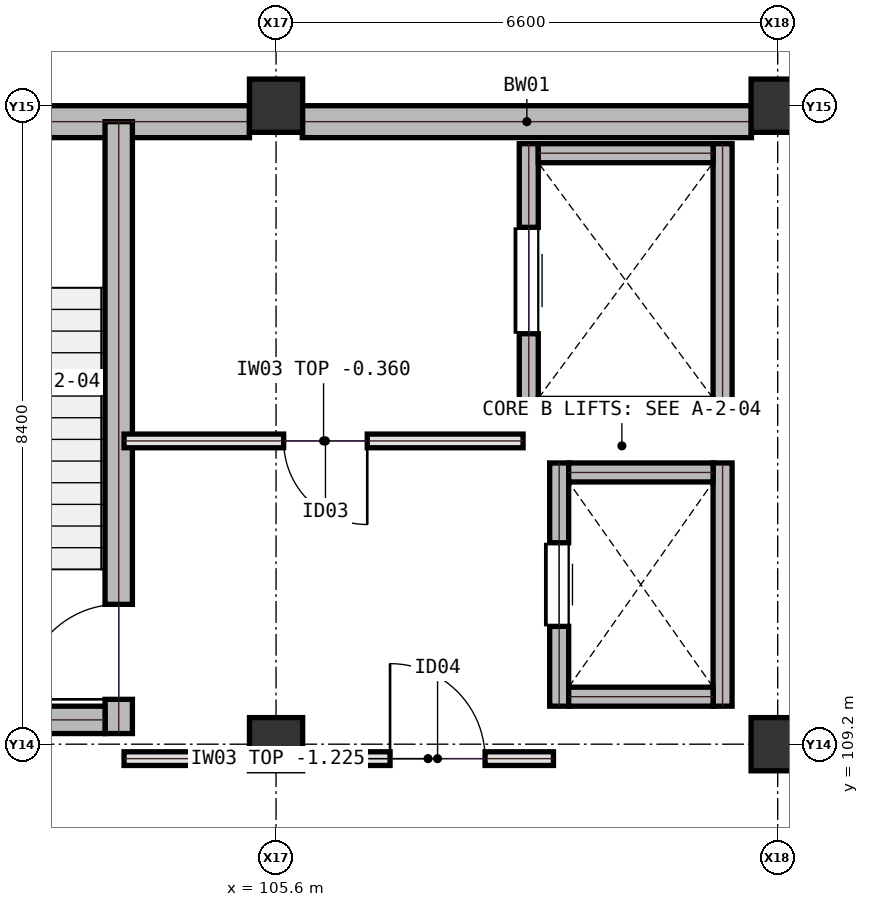
"""IFC4 building model, lengths in metres.
Left out: names, types, materials, properties, quantities, classifications, styles, units other than length and angle.
Written with IfcOpenShell. Run it as: python <this file> out.ifc"""

import sys

from ifc_helpers import new_model, si_unit, direction, frame, frame_2d, origin, origin_2d, place, context, subcontext, project, spatial, rectangle, extrude, element, fill, save


model = new_model("IFC4")
c1 = context("Model", 3, precision=1e-05, world=origin(), true_north=direction((0.0, 1.0)))
c2 = subcontext(c1, "Body", "Model", "MODEL_VIEW")
j1 = project(units=[si_unit("LENGTHUNIT", "METRE"), si_unit("PLANEANGLEUNIT", "RADIAN")], contexts=[c1])
p1 = place(None, origin())
s1 = spatial("IfcSite", under=j1, at=p1, CompositionType="ELEMENT")
p2 = place(p1, origin())
s2 = spatial("IfcBuilding", under=s1, at=p2, CompositionType="ELEMENT")
p3 = place(p2, frame((0.0, 0.0, -4.5)))
s3 = spatial("IfcBuildingStorey", under=s2, at=p3, CompositionType="ELEMENT", Elevation=-4.5)
for number, where, z_axis, x_axis in (
    (1, (105.6, 109.2, 0.0), (0.0, 0.0, 1.0), (1.0, 0.0, 0.0)),
    (2, (105.6, 117.6, 0.0), (0.0, 0.0, 1.0), (1.0, 0.0, 0.0)),
    (3, (112.2, 109.2, 0.0), (0.0, 0.0, 1.0), (1.0, 0.0, 0.0)),
    (4, (112.2, 117.6, 0.0), (0.0, 0.0, 1.0), (1.0, 0.0, 0.0)),
):
    element("IfcColumn", number, at=place(p3, frame(where, z_axis=z_axis, x_axis=x_axis)), inside=s3, PredefinedType="COLUMN", context=c2, shape_type="SweptSolid", body=[
        extrude(rectangle(XDim=0.7, YDim=0.7, at=origin_2d()), origin(), (0.0, 0.0, 1.0), 4.5),
    ])
p4 = place(p3, frame((105.25, 117.39, 0.0), z_axis=(0.0, 0.0, 1.0), x_axis=(-1.0, 0.0, 0.0)))
e5 = element("IfcWall", 5, at=p4, inside=s3, PredefinedType="SOLIDWALL", context=c2, shape_type="SweptSolid", body=[
    extrude(rectangle(XDim=5.9, YDim=0.42, at=frame_2d((2.95, 0.0))), origin(), (0.0, 0.0, 1.0), 4.14),
])
p5 = place(p3, frame((111.855, 117.39, 0.0), z_axis=(0.0, 0.0, 1.0), x_axis=(-1.0, 0.0, 0.0)))
e6 = element("IfcWall", 6, at=p5, inside=s3, PredefinedType="SOLIDWALL", context=c2, shape_type="SweptSolid", body=[
    extrude(rectangle(XDim=5.91, YDim=0.42, at=frame_2d((2.955, 0.0))), origin(), (0.0, 0.0, 1.0), 4.14),
])
p6 = place(p3, frame((103.53, 109.34, 0.0), z_axis=(0.0, 0.0, 1.0), x_axis=(0.0, 1.0, 0.0)))
e7 = element("IfcWall", 7, at=p6, inside=s3, PredefinedType="SHEAR", context=c2, shape_type="SweptSolid", body=[
    extrude(rectangle(XDim=8.05, YDim=0.36, at=frame_2d((4.025, 0.0))), origin(), (0.0, 0.0, 1.0), 4.14),
])
p7 = place(p6, frame((0.45, 0.0, 0.0)))
e8 = element("IfcOpeningElement", 8, at=p7, cuts=e7, PredefinedType="OPENING", context=c2, shape_type="SweptSolid", body=[
    extrude(rectangle(XDim=1.25, YDim=2.15, at=frame_2d((0.625, 1.075))), frame((0.0, 0.19, 0.0), z_axis=(0.0, -1.0, 0.0), x_axis=(1.0, 0.0, 0.0)), (0.0, 0.0, 1.0), 0.38),
])
p8 = place(p3, frame((99.55, 109.52, 0.0), z_axis=(0.0, 0.0, 1.0), x_axis=(1.0, 0.0, 0.0)))
e9 = element("IfcWall", 9, at=p8, inside=s3, PredefinedType="SHEAR", context=c2, shape_type="SweptSolid", body=[
    extrude(rectangle(XDim=3.8, YDim=0.36, at=frame_2d((1.9, 0.0))), origin(), (0.0, 0.0, 1.0), 4.14),
])
p9 = place(p3, frame((109.325, 109.7, 0.0), z_axis=(0.0, 0.0, 1.0), x_axis=(0.0, 1.0, 0.0)))
e10 = element("IfcWall", 10, at=p9, inside=s3, PredefinedType="SHEAR", context=c2, shape_type="SweptSolid", body=[
    extrude(rectangle(XDim=3.2, YDim=0.25, at=frame_2d((1.6, 0.0))), origin(), (0.0, 0.0, 1.0), 4.14),
])
p10 = place(p9, frame((1.05, 0.0, 0.0)))
e11 = element("IfcOpeningElement", 11, at=p10, cuts=e10, PredefinedType="OPENING", context=c2, shape_type="SweptSolid", body=[
    extrude(rectangle(XDim=1.1, YDim=2.15, at=frame_2d((0.55, 1.075))), frame((0.0, 0.135, 0.0), z_axis=(0.0, -1.0, 0.0), x_axis=(1.0, 0.0, 0.0)), (0.0, 0.0, 1.0), 0.27),
])
p11 = place(p3, frame((111.475, 109.7, 0.0), z_axis=(0.0, 0.0, 1.0), x_axis=(0.0, 1.0, 0.0)))
e12 = element("IfcWall", 12, at=p11, inside=s3, PredefinedType="SHEAR", context=c2, shape_type="SweptSolid", body=[
    extrude(rectangle(XDim=3.2, YDim=0.25, at=frame_2d((1.6, 0.0))), origin(), (0.0, 0.0, 1.0), 4.14),
])
for number, where, z_axis, x_axis in (
    (13, (109.45, 109.825, 0.0), (0.0, 0.0, 1.0), (1.0, 0.0, 0.0)),
    (14, (109.45, 112.775, 0.0), (0.0, 0.0, 1.0), (1.0, 0.0, 0.0)),
):
    element("IfcWall", number, at=place(p3, frame(where, z_axis=z_axis, x_axis=x_axis)), inside=s3, PredefinedType="SHEAR", context=c2, shape_type="SweptSolid", body=[
        extrude(rectangle(XDim=1.9, YDim=0.25, at=frame_2d((0.95, 0.0))), origin(), (0.0, 0.0, 1.0), 4.14),
    ])
p12 = place(p3, frame((108.925, 113.5, 0.0), z_axis=(0.0, 0.0, 1.0), x_axis=(0.0, 1.0, 0.0)))
e15 = element("IfcWall", 15, at=p12, inside=s3, PredefinedType="SHEAR", context=c2, shape_type="SweptSolid", body=[
    extrude(rectangle(XDim=3.6, YDim=0.25, at=frame_2d((1.8, 0.0))), origin(), (0.0, 0.0, 1.0), 4.14),
])
p13 = place(p12, frame((1.1, 0.0, 0.0)))
e16 = element("IfcOpeningElement", 16, at=p13, cuts=e15, PredefinedType="OPENING", context=c2, shape_type="SweptSolid", body=[
    extrude(rectangle(XDim=1.4, YDim=2.2, at=frame_2d((0.7, 1.1))), frame((0.0, 0.135, 0.0), z_axis=(0.0, -1.0, 0.0), x_axis=(1.0, 0.0, 0.0)), (0.0, 0.0, 1.0), 0.27),
])
p14 = place(p3, frame((111.475, 113.5, 0.0), z_axis=(0.0, 0.0, 1.0), x_axis=(0.0, 1.0, 0.0)))
e17 = element("IfcWall", 17, at=p14, inside=s3, PredefinedType="SHEAR", context=c2, shape_type="SweptSolid", body=[
    extrude(rectangle(XDim=3.6, YDim=0.25, at=frame_2d((1.8, 0.0))), origin(), (0.0, 0.0, 1.0), 4.14),
])
for number, where, z_axis, x_axis in (
    (18, (109.05, 113.625, 0.0), (0.0, 0.0, 1.0), (1.0, 0.0, 0.0)),
    (19, (109.05, 116.975, 0.0), (0.0, 0.0, 1.0), (1.0, 0.0, 0.0)),
):
    element("IfcWall", number, at=place(p3, frame(where, z_axis=z_axis, x_axis=x_axis)), inside=s3, PredefinedType="SHEAR", context=c2, shape_type="SweptSolid", body=[
        extrude(rectangle(XDim=2.3, YDim=0.25, at=frame_2d((1.15, 0.0))), origin(), (0.0, 0.0, 1.0), 4.14),
    ])
p15 = place(p3, frame((103.6, 109.01, 0.0), z_axis=(0.0, 0.0, 1.0), x_axis=(1.0, 0.0, 0.0)))
e20 = element("IfcWall", 20, at=p15, inside=s3, PredefinedType="SOLIDWALL", context=c2, shape_type="SweptSolid", body=[
    extrude(rectangle(XDim=1.65, YDim=0.18, at=frame_2d((0.825, 0.0))), origin(), (0.0, 0.0, 1.0), 3.275),
])
p16 = place(p3, frame((105.95, 109.01, 0.0), z_axis=(0.0, 0.0, 1.0), x_axis=(1.0, 0.0, 0.0)))
e21 = element("IfcWall", 21, at=p16, inside=s3, PredefinedType="SOLIDWALL", context=c2, shape_type="SweptSolid", body=[
    extrude(rectangle(XDim=3.3, YDim=0.18, at=frame_2d((1.65, 0.0))), origin(), (0.0, 0.0, 1.0), 3.275),
])
p17 = place(p16, frame((1.15, 0.0, 0.0)))
e22 = element("IfcOpeningElement", 22, at=p17, cuts=e21, PredefinedType="OPENING", context=c2, shape_type="SweptSolid", body=[
    extrude(rectangle(XDim=1.25, YDim=2.15, at=frame_2d((0.625, 1.075))), frame((0.0, 0.1, 0.0), z_axis=(0.0, -1.0, 0.0), x_axis=(1.0, 0.0, 0.0)), (0.0, 0.0, 1.0), 0.2),
])
p18 = place(p3, frame((103.6, 113.19, 0.0), z_axis=(0.0, 0.0, 1.0), x_axis=(1.0, 0.0, 0.0)))
e23 = element("IfcWall", 23, at=p18, inside=s3, PredefinedType="SOLIDWALL", context=c2, shape_type="SweptSolid", body=[
    extrude(rectangle(XDim=5.25, YDim=0.18, at=frame_2d((2.625, 0.0))), origin(), (0.0, 0.0, 1.0), 4.14),
])
p19 = place(p18, frame((2.1, 0.0, 0.0)))
e24 = element("IfcOpeningElement", 24, at=p19, cuts=e23, PredefinedType="OPENING", context=c2, shape_type="SweptSolid", body=[
    extrude(rectangle(XDim=1.1, YDim=2.15, at=frame_2d((0.55, 1.075))), frame((0.0, 0.1, 0.0), z_axis=(0.0, -1.0, 0.0), x_axis=(1.0, 0.0, 0.0)), (0.0, 0.0, 1.0), 0.2),
])
p20 = place(p7, origin())
e25 = element("IfcDoor", 25, at=p20, inside=s3, OperationType="SINGLE_SWING_LEFT", PredefinedType="DOOR", context=c2, shape_type="SweptSolid", body=[
    extrude(rectangle(XDim=1.25, YDim=2.15, at=frame_2d((0.625, 1.075))), frame((0.0, 0.025, 0.0), z_axis=(0.0, -1.0, 0.0), x_axis=(1.0, 0.0, 0.0)), (0.0, 0.0, 1.0), 0.05),
])
fill(e8, e25)
p21 = place(p10, origin())
e26 = element("IfcDoor", 26, at=p21, inside=s3, OperationType="SLIDING_TO_LEFT", PredefinedType="DOOR", context=c2, shape_type="SweptSolid", body=[
    extrude(rectangle(XDim=1.1, YDim=2.15, at=frame_2d((0.55, 1.075))), frame((0.0, 0.025, 0.0), z_axis=(0.0, -1.0, 0.0), x_axis=(1.0, 0.0, 0.0)), (0.0, 0.0, 1.0), 0.05),
])
fill(e11, e26)
p22 = place(p13, origin())
e27 = element("IfcDoor", 27, at=p22, inside=s3, OperationType="SLIDING_TO_LEFT", PredefinedType="DOOR", context=c2, shape_type="SweptSolid", body=[
    extrude(rectangle(XDim=1.4, YDim=2.2, at=frame_2d((0.7, 1.1))), frame((0.0, 0.025, 0.0), z_axis=(0.0, -1.0, 0.0), x_axis=(1.0, 0.0, 0.0)), (0.0, 0.0, 1.0), 0.05),
])
fill(e16, e27)
p23 = place(p17, origin())
e28 = element("IfcDoor", 28, at=p23, inside=s3, OperationType="SINGLE_SWING_LEFT", PredefinedType="DOOR", context=c2, shape_type="SweptSolid", body=[
    extrude(rectangle(XDim=1.25, YDim=2.15, at=frame_2d((0.625, 1.075))), frame((0.0, 0.025, 0.0), z_axis=(0.0, -1.0, 0.0), x_axis=(1.0, 0.0, 0.0)), (0.0, 0.0, 1.0), 0.05),
])
fill(e22, e28)
p24 = place(p19, frame((1.1, 0.0, 0.0), z_axis=(0.0, 0.0, 1.0), x_axis=(-1.0, 0.0, 0.0)))
e29 = element("IfcDoor", 29, at=p24, inside=s3, OperationType="SINGLE_SWING_RIGHT", PredefinedType="DOOR", context=c2, shape_type="SweptSolid", body=[
    extrude(rectangle(XDim=1.1, YDim=2.15, at=frame_2d((0.55, 1.075))), frame((0.0, 0.025, 0.0), z_axis=(0.0, -1.0, 0.0), x_axis=(1.0, 0.0, 0.0)), (0.0, 0.0, 1.0), 0.05),
])
fill(e24, e29)
save(model, sys.argv[1])
